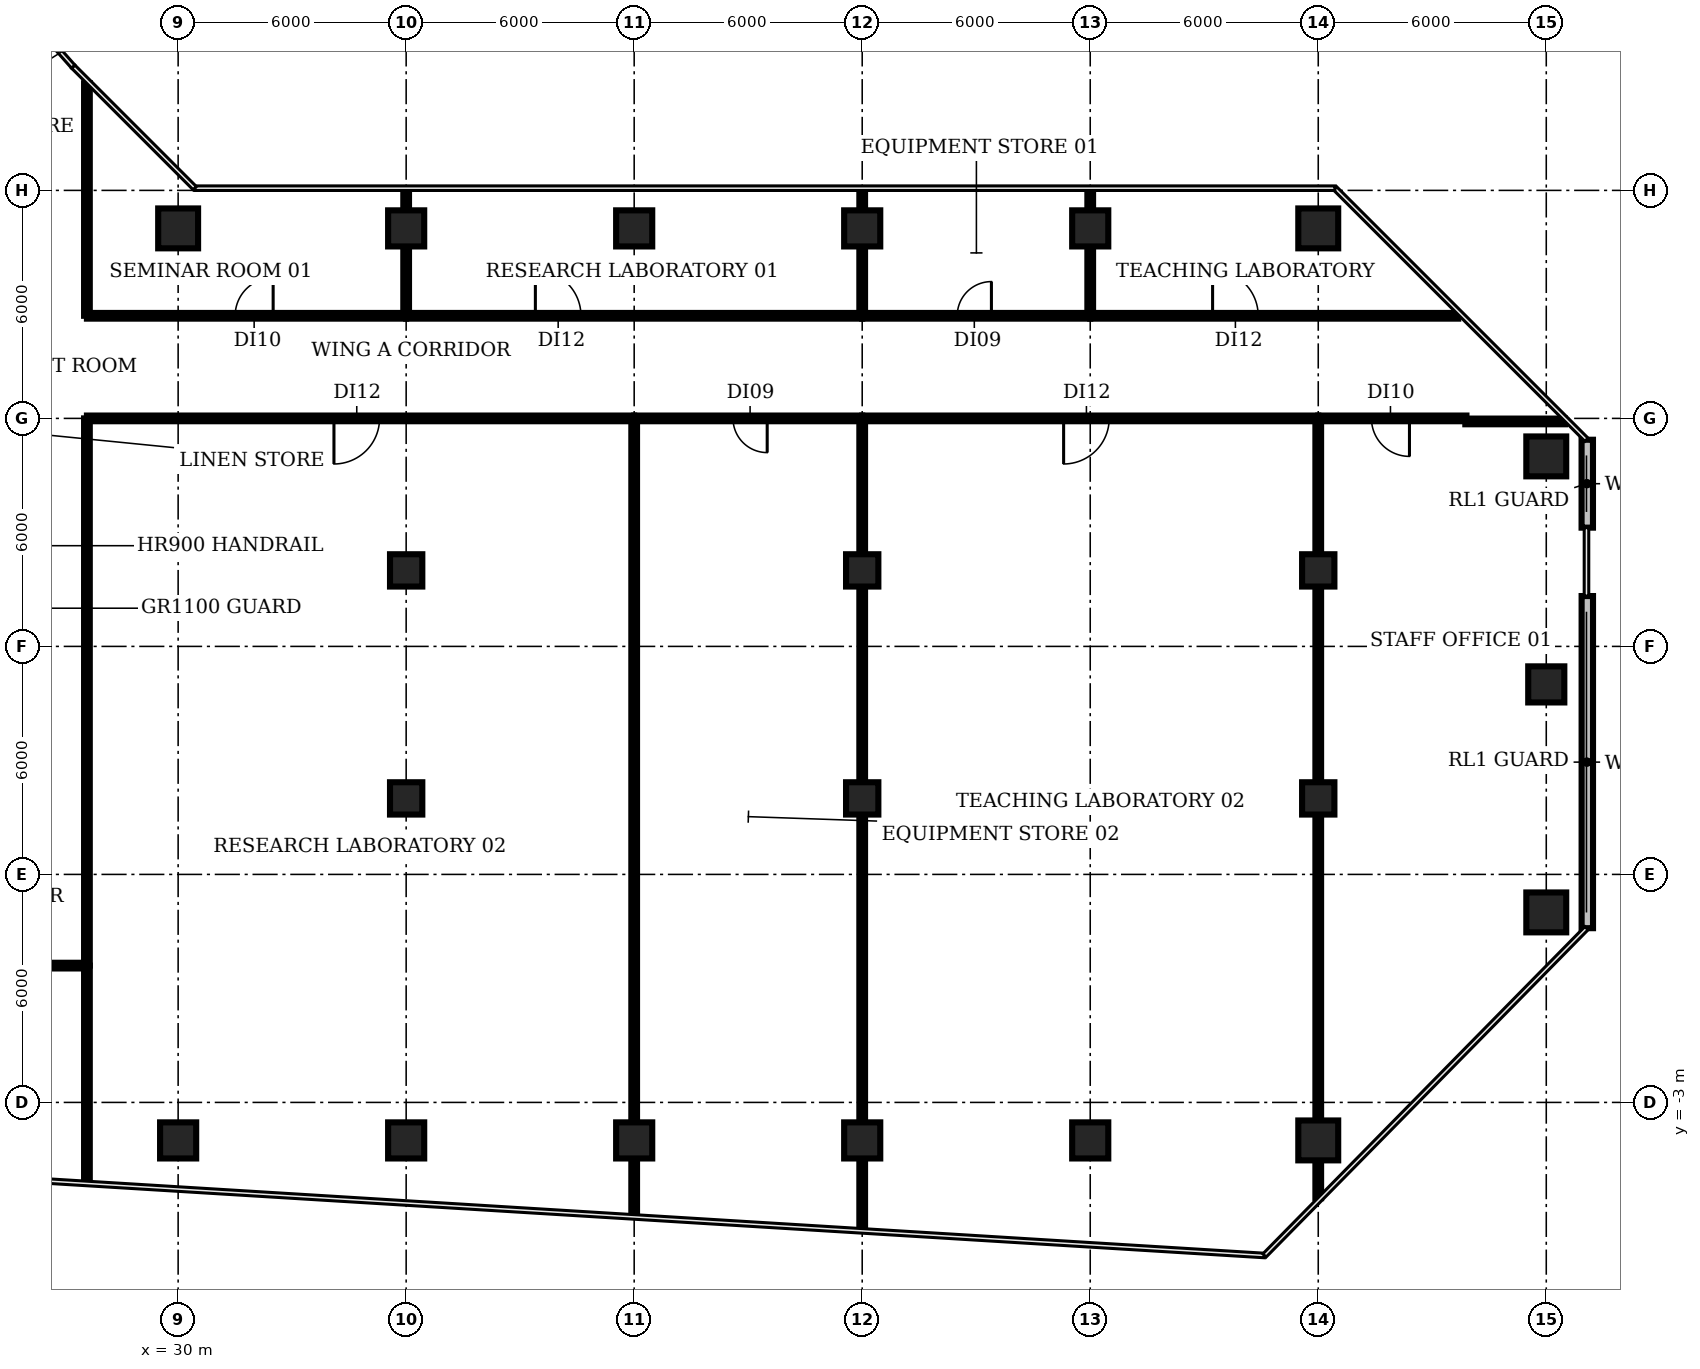
"""IFC4 building model, lengths in metres.
Left out: names, types, materials, properties, quantities, classifications, styles, units other than length and angle.
Written with IfcOpenShell. Run it as: python <this file> out.ifc"""

import sys

from ifc_helpers import new_model, si_unit, direction, frame, frame_2d, origin, origin_2d, place, context, subcontext, project, spatial, rectangle, circle, extrude, element, fill, save


model = new_model("IFC4")
c1 = context("Model", 3, precision=1e-05, world=origin(), true_north=direction((0.0, 1.0)))
c2 = subcontext(c1, "Body", "Model", "MODEL_VIEW")
j1 = project(units=[si_unit("LENGTHUNIT", "METRE"), si_unit("PLANEANGLEUNIT", "RADIAN")], contexts=[c1])
p1 = place(None, origin())
s1 = spatial("IfcSite", under=j1, at=p1, CompositionType="ELEMENT")
p2 = place(p1, origin())
s2 = spatial("IfcBuilding", under=s1, at=p2, CompositionType="ELEMENT")
p3 = place(p2, frame((0.0, 0.0, 37.4)))
s3 = spatial("IfcBuildingStorey", under=s2, at=p3, CompositionType="ELEMENT", Elevation=37.4)
p4 = place(p3, frame((30.0, -4.0, 0.0), z_axis=(0.0, 0.0, 1.0), x_axis=(1.0, 0.0, 0.0)))
e1 = element("IfcColumn", 1, at=p4, inside=s3, PredefinedType="COLUMN", context=c2, shape_type="SweptSolid", body=[
    extrude(rectangle(XDim=0.95, YDim=0.95, at=origin_2d()), origin(), (0.0, 0.0, 1.0), 3.85),
])
p5 = place(p3, frame((30.0, 20.0, 0.0), z_axis=(0.0, 0.0, 1.0), x_axis=(1.0, 0.0, 0.0)))
e2 = element("IfcColumn", 2, at=p5, inside=s3, PredefinedType="COLUMN", context=c2, shape_type="SweptSolid", body=[
    extrude(circle(Radius=0.525, at=origin_2d()), origin(), (0.0, 0.0, 1.0), 3.85),
])
p6 = place(p3, frame((36.0, -4.0, 0.0), z_axis=(0.0, 0.0, 1.0), x_axis=(1.0, 0.0, 0.0)))
e3 = element("IfcColumn", 3, at=p6, inside=s3, PredefinedType="COLUMN", context=c2, shape_type="SweptSolid", body=[
    extrude(rectangle(XDim=0.95, YDim=0.95, at=origin_2d()), origin(), (0.0, 0.0, 1.0), 3.85),
])
for number, where, z_axis, x_axis in (
    (4, (36.0, 5.0, 0.0), (0.0, 0.0, 1.0), (1.0, 0.0, 0.0)),
    (5, (36.0, 11.0, 0.0), (0.0, 0.0, 1.0), (1.0, 0.0, 0.0)),
):
    element("IfcColumn", number, at=place(p3, frame(where, z_axis=z_axis, x_axis=x_axis)), inside=s3, PredefinedType="COLUMN", context=c2, shape_type="SweptSolid", body=[
        extrude(rectangle(XDim=0.85, YDim=0.85, at=origin_2d()), origin(), (0.0, 0.0, 1.0), 3.85),
    ])
for number, where, z_axis, x_axis in (
    (6, (36.0, 20.0, 0.0), (0.0, 0.0, 1.0), (1.0, 0.0, 0.0)),
    (7, (42.0, -4.0, 0.0), (0.0, 0.0, 1.0), (1.0, 0.0, 0.0)),
    (8, (42.0, 20.0, 0.0), (0.0, 0.0, 1.0), (1.0, 0.0, 0.0)),
    (9, (48.0, -4.0, 0.0), (0.0, 0.0, 1.0), (1.0, 0.0, 0.0)),
):
    element("IfcColumn", number, at=place(p3, frame(where, z_axis=z_axis, x_axis=x_axis)), inside=s3, PredefinedType="COLUMN", context=c2, shape_type="SweptSolid", body=[
        extrude(rectangle(XDim=0.95, YDim=0.95, at=origin_2d()), origin(), (0.0, 0.0, 1.0), 3.85),
    ])
for number, where, z_axis, x_axis in (
    (10, (48.0, 5.0, 0.0), (0.0, 0.0, 1.0), (1.0, 0.0, 0.0)),
    (11, (48.0, 11.0, 0.0), (0.0, 0.0, 1.0), (1.0, 0.0, 0.0)),
):
    element("IfcColumn", number, at=place(p3, frame(where, z_axis=z_axis, x_axis=x_axis)), inside=s3, PredefinedType="COLUMN", context=c2, shape_type="SweptSolid", body=[
        extrude(rectangle(XDim=0.85, YDim=0.85, at=origin_2d()), origin(), (0.0, 0.0, 1.0), 3.85),
    ])
for number, where, z_axis, x_axis in (
    (12, (48.0, 20.0, 0.0), (0.0, 0.0, 1.0), (1.0, 0.0, 0.0)),
    (13, (54.0, -4.0, 0.0), (0.0, 0.0, 1.0), (1.0, 0.0, 0.0)),
    (14, (54.0, 20.0, 0.0), (0.0, 0.0, 1.0), (1.0, 0.0, 0.0)),
):
    element("IfcColumn", number, at=place(p3, frame(where, z_axis=z_axis, x_axis=x_axis)), inside=s3, PredefinedType="COLUMN", context=c2, shape_type="SweptSolid", body=[
        extrude(rectangle(XDim=0.95, YDim=0.95, at=origin_2d()), origin(), (0.0, 0.0, 1.0), 3.85),
    ])
p7 = place(p3, frame((60.0, -4.0, 0.0), z_axis=(0.0, 0.0, 1.0), x_axis=(1.0, 0.0, 0.0)))
e15 = element("IfcColumn", 15, at=p7, inside=s3, PredefinedType="COLUMN", context=c2, shape_type="SweptSolid", body=[
    extrude(circle(Radius=0.525, at=origin_2d()), origin(), (0.0, 0.0, 1.0), 3.85),
])
for number, where, z_axis, x_axis in (
    (16, (60.0, 5.0, 0.0), (0.0, 0.0, 1.0), (1.0, 0.0, 0.0)),
    (17, (60.0, 11.0, 0.0), (0.0, 0.0, 1.0), (1.0, 0.0, 0.0)),
):
    element("IfcColumn", number, at=place(p3, frame(where, z_axis=z_axis, x_axis=x_axis)), inside=s3, PredefinedType="COLUMN", context=c2, shape_type="SweptSolid", body=[
        extrude(rectangle(XDim=0.85, YDim=0.85, at=origin_2d()), origin(), (0.0, 0.0, 1.0), 3.85),
    ])
for number, where, z_axis, x_axis in (
    (18, (60.0, 20.0, 0.0), (0.0, 0.0, 1.0), (1.0, 0.0, 0.0)),
    (19, (66.0, 2.0, 0.0), (0.0, 0.0, 1.0), (1.0, 0.0, 0.0)),
):
    element("IfcColumn", number, at=place(p3, frame(where, z_axis=z_axis, x_axis=x_axis)), inside=s3, PredefinedType="COLUMN", context=c2, shape_type="SweptSolid", body=[
        extrude(circle(Radius=0.525, at=origin_2d()), origin(), (0.0, 0.0, 1.0), 3.85),
    ])
p8 = place(p3, frame((66.0, 8.0, 0.0), z_axis=(0.0, 0.0, 1.0), x_axis=(1.0, 0.0, 0.0)))
e20 = element("IfcColumn", 20, at=p8, inside=s3, PredefinedType="COLUMN", context=c2, shape_type="SweptSolid", body=[
    extrude(rectangle(XDim=0.95, YDim=0.95, at=origin_2d()), origin(), (0.0, 0.0, 1.0), 3.85),
])
p9 = place(p3, frame((66.0, 14.0, 0.0), z_axis=(0.0, 0.0, 1.0), x_axis=(1.0, 0.0, 0.0)))
e21 = element("IfcColumn", 21, at=p9, inside=s3, PredefinedType="COLUMN", context=c2, shape_type="SweptSolid", body=[
    extrude(circle(Radius=0.525, at=origin_2d()), origin(), (0.0, 0.0, 1.0), 3.85),
])
p10 = place(p3, frame((67.08, 1.585, 0.0), z_axis=(0.0, 0.0, 1.0), x_axis=(0.0, 1.0, 0.0)))
e22 = element("IfcWall", 22, at=p10, inside=s3, PredefinedType="SOLIDWALL", context=c2, shape_type="SweptSolid", body=[
    extrude(rectangle(XDim=8.74, YDim=0.3, at=frame_2d((4.37, 0.0))), origin(), (0.0, 0.0, 1.0), 3.85),
])
p11 = place(p3, frame((67.079, 12.125, 0.0), z_axis=(0.0, 0.0, 1.0), x_axis=(0.0, 1.0, 0.0)))
e23 = element("IfcWall", 23, at=p11, inside=s3, PredefinedType="SOLIDWALL", context=c2, shape_type="SweptSolid", body=[
    extrude(rectangle(XDim=2.313, YDim=0.3, at=frame_2d((1.157, 0.0))), origin(), (0.0, 0.0, 1.0), 3.85),
])
p12 = place(p3, frame((27.6, -5.08, 0.0), z_axis=(0.0, 0.0, 1.0), x_axis=(0.0, 1.0, 0.0)))
e24 = element("IfcWall", 24, at=p12, inside=s3, PredefinedType="PARTITIONING", context=c2, shape_type="SweptSolid", body=[
    extrude(rectangle(XDim=5.68, YDim=0.15, at=frame_2d((2.84, 0.0))), origin(), (0.0, 0.0, 1.0), 2.83),
])
p13 = place(p3, frame((27.6, 0.6, 0.0), z_axis=(0.0, 0.0, 1.0), x_axis=(-1.0, 0.0, 0.0)))
e25 = element("IfcWall", 25, at=p13, inside=s3, PredefinedType="PARTITIONING", context=c2, shape_type="SweptSolid", body=[
    extrude(rectangle(XDim=25.2, YDim=0.15, at=frame_2d((12.6, 0.0))), origin(), (0.0, 0.0, 1.0), 2.83),
])
p14 = place(p13, frame((12.1, 0.0, 0.0)))
e26 = element("IfcOpeningElement", 26, at=p14, cuts=e25, PredefinedType="OPENING", context=c2, shape_type="SweptSolid", body=[
    extrude(rectangle(XDim=1.2, YDim=2.1, at=frame_2d((0.6, 1.05))), frame((0.0, 0.085, 0.0), z_axis=(0.0, -1.0, 0.0), x_axis=(1.0, 0.0, 0.0)), (0.0, 0.0, 1.0), 0.17),
])
p15 = place(p3, frame((27.6, 0.6, 0.0), z_axis=(0.0, 0.0, 1.0), x_axis=(0.0, 1.0, 0.0)))
e27 = element("IfcWall", 27, at=p15, inside=s3, PredefinedType="PARTITIONING", context=c2, shape_type="SweptSolid", body=[
    extrude(rectangle(XDim=14.4, YDim=0.15, at=frame_2d((7.2, 0.0))), origin(), (0.0, 0.0, 1.0), 2.83),
])
p16 = place(p3, frame((27.6, 17.7, 0.0), z_axis=(0.0, 0.0, 1.0), x_axis=(0.0, 1.0, 0.0)))
e28 = element("IfcWall", 28, at=p16, inside=s3, PredefinedType="PARTITIONING", context=c2, shape_type="SweptSolid", body=[
    extrude(rectangle(XDim=6.12, YDim=0.15, at=frame_2d((3.06, 0.0))), origin(), (0.0, 0.0, 1.0), 2.83),
])
p17 = place(p3, frame((27.6, 17.7, 0.0), z_axis=(0.0, 0.0, 1.0), x_axis=(1.0, 0.0, 0.0)))
e29 = element("IfcWall", 29, at=p17, inside=s3, PredefinedType="PARTITIONING", context=c2, shape_type="SweptSolid", body=[
    extrude(rectangle(XDim=8.4, YDim=0.15, at=frame_2d((4.2, 0.0))), origin(), (0.0, 0.0, 1.0), 2.83),
])
p18 = place(p17, frame((3.9, 0.0, 0.0)))
e30 = element("IfcOpeningElement", 30, at=p18, cuts=e29, PredefinedType="OPENING", context=c2, shape_type="SweptSolid", body=[
    extrude(rectangle(XDim=1.0, YDim=2.1, at=frame_2d((0.5, 1.05))), frame((0.0, 0.085, 0.0), z_axis=(0.0, -1.0, 0.0), x_axis=(1.0, 0.0, 0.0)), (0.0, 0.0, 1.0), 0.17),
])
p19 = place(p3, frame((36.0, 17.7, 0.0), z_axis=(0.0, 0.0, 1.0), x_axis=(0.0, 1.0, 0.0)))
e31 = element("IfcWall", 31, at=p19, inside=s3, PredefinedType="PARTITIONING", context=c2, shape_type="SweptSolid", body=[
    extrude(rectangle(XDim=3.31, YDim=0.15, at=frame_2d((1.655, 0.0))), origin(), (0.0, 0.0, 1.0), 2.83),
])
p20 = place(p3, frame((36.0, 17.7, 0.0), z_axis=(0.0, 0.0, 1.0), x_axis=(1.0, 0.0, 0.0)))
e32 = element("IfcWall", 32, at=p20, inside=s3, PredefinedType="PARTITIONING", context=c2, shape_type="SweptSolid", body=[
    extrude(rectangle(XDim=12.0, YDim=0.15, at=frame_2d((6.0, 0.0))), origin(), (0.0, 0.0, 1.0), 2.83),
])
p21 = place(p20, frame((3.4, 0.0, 0.0)))
e33 = element("IfcOpeningElement", 33, at=p21, cuts=e32, PredefinedType="OPENING", context=c2, shape_type="SweptSolid", body=[
    extrude(rectangle(XDim=1.2, YDim=2.1, at=frame_2d((0.6, 1.05))), frame((0.0, 0.085, 0.0), z_axis=(0.0, -1.0, 0.0), x_axis=(1.0, 0.0, 0.0)), (0.0, 0.0, 1.0), 0.17),
])
p22 = place(p3, frame((42.0, -5.96, 0.0), z_axis=(0.0, 0.0, 1.0), x_axis=(0.0, 1.0, 0.0)))
e34 = element("IfcWall", 34, at=p22, inside=s3, PredefinedType="PARTITIONING", context=c2, shape_type="SweptSolid", body=[
    extrude(rectangle(XDim=20.96, YDim=0.15, at=frame_2d((10.48, 0.0))), origin(), (0.0, 0.0, 1.0), 2.83),
])
p23 = place(p3, frame((42.0, 15.0, 0.0), z_axis=(0.0, 0.0, 1.0), x_axis=(-1.0, 0.0, 0.0)))
e35 = element("IfcWall", 35, at=p23, inside=s3, PredefinedType="PARTITIONING", context=c2, shape_type="SweptSolid", body=[
    extrude(rectangle(XDim=14.4, YDim=0.15, at=frame_2d((7.2, 0.0))), origin(), (0.0, 0.0, 1.0), 2.83),
])
p24 = place(p23, frame((6.7, 0.0, 0.0)))
e36 = element("IfcOpeningElement", 36, at=p24, cuts=e35, PredefinedType="OPENING", context=c2, shape_type="SweptSolid", body=[
    extrude(rectangle(XDim=1.2, YDim=2.1, at=frame_2d((0.6, 1.05))), frame((0.0, 0.085, 0.0), z_axis=(0.0, -1.0, 0.0), x_axis=(1.0, 0.0, 0.0)), (0.0, 0.0, 1.0), 0.17),
])
p25 = place(p3, frame((48.0, -6.33, 0.0), z_axis=(0.0, 0.0, 1.0), x_axis=(0.0, 1.0, 0.0)))
e37 = element("IfcWall", 37, at=p25, inside=s3, PredefinedType="PARTITIONING", context=c2, shape_type="SweptSolid", body=[
    extrude(rectangle(XDim=21.33, YDim=0.15, at=frame_2d((10.665, 0.0))), origin(), (0.0, 0.0, 1.0), 2.83),
])
p26 = place(p3, frame((48.0, 15.0, 0.0), z_axis=(0.0, 0.0, 1.0), x_axis=(-1.0, 0.0, 0.0)))
e38 = element("IfcWall", 38, at=p26, inside=s3, PredefinedType="PARTITIONING", context=c2, shape_type="SweptSolid", body=[
    extrude(rectangle(XDim=6.0, YDim=0.15, at=frame_2d((3.0, 0.0))), origin(), (0.0, 0.0, 1.0), 2.83),
])
p27 = place(p26, frame((2.5, 0.0, 0.0)))
e39 = element("IfcOpeningElement", 39, at=p27, cuts=e38, PredefinedType="OPENING", context=c2, shape_type="SweptSolid", body=[
    extrude(rectangle(XDim=0.9, YDim=2.1, at=frame_2d((0.45, 1.05))), frame((0.0, 0.085, 0.0), z_axis=(0.0, -1.0, 0.0), x_axis=(1.0, 0.0, 0.0)), (0.0, 0.0, 1.0), 0.17),
])
p28 = place(p3, frame((48.0, 17.7, 0.0), z_axis=(0.0, 0.0, 1.0), x_axis=(0.0, 1.0, 0.0)))
e40 = element("IfcWall", 40, at=p28, inside=s3, PredefinedType="PARTITIONING", context=c2, shape_type="SweptSolid", body=[
    extrude(rectangle(XDim=3.31, YDim=0.15, at=frame_2d((1.655, 0.0))), origin(), (0.0, 0.0, 1.0), 2.83),
])
p29 = place(p3, frame((48.0, 17.7, 0.0), z_axis=(0.0, 0.0, 1.0), x_axis=(1.0, 0.0, 0.0)))
e41 = element("IfcWall", 41, at=p29, inside=s3, PredefinedType="PARTITIONING", context=c2, shape_type="SweptSolid", body=[
    extrude(rectangle(XDim=6.0, YDim=0.15, at=frame_2d((3.0, 0.0))), origin(), (0.0, 0.0, 1.0), 2.83),
])
p30 = place(p29, frame((2.5, 0.0, 0.0)))
e42 = element("IfcOpeningElement", 42, at=p30, cuts=e41, PredefinedType="OPENING", context=c2, shape_type="SweptSolid", body=[
    extrude(rectangle(XDim=0.9, YDim=2.1, at=frame_2d((0.45, 1.05))), frame((0.0, 0.085, 0.0), z_axis=(0.0, -1.0, 0.0), x_axis=(1.0, 0.0, 0.0)), (0.0, 0.0, 1.0), 0.17),
])
p31 = place(p3, frame((54.0, 17.7, 0.0), z_axis=(0.0, 0.0, 1.0), x_axis=(0.0, 1.0, 0.0)))
e43 = element("IfcWall", 43, at=p31, inside=s3, PredefinedType="PARTITIONING", context=c2, shape_type="SweptSolid", body=[
    extrude(rectangle(XDim=3.31, YDim=0.15, at=frame_2d((1.655, 0.0))), origin(), (0.0, 0.0, 1.0), 2.83),
])
p32 = place(p3, frame((54.0, 17.7, 0.0), z_axis=(0.0, 0.0, 1.0), x_axis=(1.0, 0.0, 0.0)))
e44 = element("IfcWall", 44, at=p32, inside=s3, PredefinedType="PARTITIONING", context=c2, shape_type="SweptSolid", body=[
    extrude(rectangle(XDim=9.683, YDim=0.15, at=frame_2d((4.842, 0.0))), origin(), (0.0, 0.0, 1.0), 2.83),
])
p33 = place(p32, frame((3.22, 0.0, 0.0)))
e45 = element("IfcOpeningElement", 45, at=p33, cuts=e44, PredefinedType="OPENING", context=c2, shape_type="SweptSolid", body=[
    extrude(rectangle(XDim=1.2, YDim=2.1, at=frame_2d((0.6, 1.05))), frame((0.0, 0.085, 0.0), z_axis=(0.0, -1.0, 0.0), x_axis=(1.0, 0.0, 0.0)), (0.0, 0.0, 1.0), 0.17),
])
p34 = place(p3, frame((60.0, -5.52, 0.0), z_axis=(0.0, 0.0, 1.0), x_axis=(0.0, 1.0, 0.0)))
e46 = element("IfcWall", 46, at=p34, inside=s3, PredefinedType="PARTITIONING", context=c2, shape_type="SweptSolid", body=[
    extrude(rectangle(XDim=20.52, YDim=0.15, at=frame_2d((10.26, 0.0))), origin(), (0.0, 0.0, 1.0), 2.83),
])
p35 = place(p3, frame((60.0, 15.0, 0.0), z_axis=(0.0, 0.0, 1.0), x_axis=(-1.0, 0.0, 0.0)))
e47 = element("IfcWall", 47, at=p35, inside=s3, PredefinedType="PARTITIONING", context=c2, shape_type="SweptSolid", body=[
    extrude(rectangle(XDim=12.0, YDim=0.15, at=frame_2d((6.0, 0.0))), origin(), (0.0, 0.0, 1.0), 2.83),
])
p36 = place(p35, frame((5.5, 0.0, 0.0)))
e48 = element("IfcOpeningElement", 48, at=p36, cuts=e47, PredefinedType="OPENING", context=c2, shape_type="SweptSolid", body=[
    extrude(rectangle(XDim=1.2, YDim=2.1, at=frame_2d((0.6, 1.05))), frame((0.0, 0.085, 0.0), z_axis=(0.0, -1.0, 0.0), x_axis=(1.0, 0.0, 0.0)), (0.0, 0.0, 1.0), 0.17),
])
p37 = place(p3, frame((63.87, 14.92, 0.0), z_axis=(0.0, 0.0, 1.0), x_axis=(1.0, 0.0, 0.0)))
e49 = element("IfcWall", 49, at=p37, inside=s3, PredefinedType="PARTITIONING", context=c2, shape_type="SweptSolid", body=[
    extrude(rectangle(XDim=2.621, YDim=0.15, at=frame_2d((1.311, 0.0))), origin(), (0.0, 0.0, 1.0), 2.83),
])
p38 = place(p3, frame((63.9, 15.0, 0.0), z_axis=(0.0, 0.0, 1.0), x_axis=(-1.0, 0.0, 0.0)))
e50 = element("IfcWall", 50, at=p38, inside=s3, PredefinedType="PARTITIONING", context=c2, shape_type="SweptSolid", body=[
    extrude(rectangle(XDim=3.9, YDim=0.15, at=frame_2d((1.95, 0.0))), origin(), (0.0, 0.0, 1.0), 2.83),
])
p39 = place(p38, frame((1.5, 0.0, 0.0)))
e51 = element("IfcOpeningElement", 51, at=p39, cuts=e50, PredefinedType="OPENING", context=c2, shape_type="SweptSolid", body=[
    extrude(rectangle(XDim=1.0, YDim=2.1, at=frame_2d((0.5, 1.05))), frame((0.0, 0.085, 0.0), z_axis=(0.0, -1.0, 0.0), x_axis=(1.0, 0.0, 0.0)), (0.0, 0.0, 1.0), 0.17),
])
p40 = place(p18, origin())
e52 = element("IfcDoor", 52, at=p40, inside=s3, OperationType="SINGLE_SWING_RIGHT", PredefinedType="DOOR", context=c2, shape_type="SweptSolid", body=[
    extrude(rectangle(XDim=1.0, YDim=2.1, at=frame_2d((0.5, 1.05))), frame((0.0, 0.025, 0.0), z_axis=(0.0, -1.0, 0.0), x_axis=(1.0, 0.0, 0.0)), (0.0, 0.0, 1.0), 0.05),
])
fill(e30, e52)
p41 = place(p21, origin())
e53 = element("IfcDoor", 53, at=p41, inside=s3, OperationType="SINGLE_SWING_LEFT", PredefinedType="DOOR", context=c2, shape_type="SweptSolid", body=[
    extrude(rectangle(XDim=1.2, YDim=2.1, at=frame_2d((0.6, 1.05))), frame((0.0, 0.025, 0.0), z_axis=(0.0, -1.0, 0.0), x_axis=(1.0, 0.0, 0.0)), (0.0, 0.0, 1.0), 0.05),
])
fill(e33, e53)
p42 = place(p24, origin())
e54 = element("IfcDoor", 54, at=p42, inside=s3, OperationType="SINGLE_SWING_RIGHT", PredefinedType="DOOR", context=c2, shape_type="SweptSolid", body=[
    extrude(rectangle(XDim=1.2, YDim=2.1, at=frame_2d((0.6, 1.05))), frame((0.0, 0.025, 0.0), z_axis=(0.0, -1.0, 0.0), x_axis=(1.0, 0.0, 0.0)), (0.0, 0.0, 1.0), 0.05),
])
fill(e36, e54)
p43 = place(p27, origin())
e55 = element("IfcDoor", 55, at=p43, inside=s3, OperationType="SINGLE_SWING_LEFT", PredefinedType="DOOR", context=c2, shape_type="SweptSolid", body=[
    extrude(rectangle(XDim=0.9, YDim=2.1, at=frame_2d((0.45, 1.05))), frame((0.0, 0.025, 0.0), z_axis=(0.0, -1.0, 0.0), x_axis=(1.0, 0.0, 0.0)), (0.0, 0.0, 1.0), 0.05),
])
fill(e39, e55)
p44 = place(p30, origin())
e56 = element("IfcDoor", 56, at=p44, inside=s3, OperationType="SINGLE_SWING_RIGHT", PredefinedType="DOOR", context=c2, shape_type="SweptSolid", body=[
    extrude(rectangle(XDim=0.9, YDim=2.1, at=frame_2d((0.45, 1.05))), frame((0.0, 0.025, 0.0), z_axis=(0.0, -1.0, 0.0), x_axis=(1.0, 0.0, 0.0)), (0.0, 0.0, 1.0), 0.05),
])
fill(e42, e56)
p45 = place(p33, origin())
e57 = element("IfcDoor", 57, at=p45, inside=s3, OperationType="SINGLE_SWING_LEFT", PredefinedType="DOOR", context=c2, shape_type="SweptSolid", body=[
    extrude(rectangle(XDim=1.2, YDim=2.1, at=frame_2d((0.6, 1.05))), frame((0.0, 0.025, 0.0), z_axis=(0.0, -1.0, 0.0), x_axis=(1.0, 0.0, 0.0)), (0.0, 0.0, 1.0), 0.05),
])
fill(e45, e57)
p46 = place(p36, origin())
e58 = element("IfcDoor", 58, at=p46, inside=s3, OperationType="SINGLE_SWING_RIGHT", PredefinedType="DOOR", context=c2, shape_type="SweptSolid", body=[
    extrude(rectangle(XDim=1.2, YDim=2.1, at=frame_2d((0.6, 1.05))), frame((0.0, 0.025, 0.0), z_axis=(0.0, -1.0, 0.0), x_axis=(1.0, 0.0, 0.0)), (0.0, 0.0, 1.0), 0.05),
])
fill(e48, e58)
p47 = place(p39, origin())
e59 = element("IfcDoor", 59, at=p47, inside=s3, OperationType="SINGLE_SWING_LEFT", PredefinedType="DOOR", context=c2, shape_type="SweptSolid", body=[
    extrude(rectangle(XDim=1.0, YDim=2.1, at=frame_2d((0.5, 1.05))), frame((0.0, 0.025, 0.0), z_axis=(0.0, -1.0, 0.0), x_axis=(1.0, 0.0, 0.0)), (0.0, 0.0, 1.0), 0.05),
])
fill(e51, e59)
save(model, sys.argv[1])
